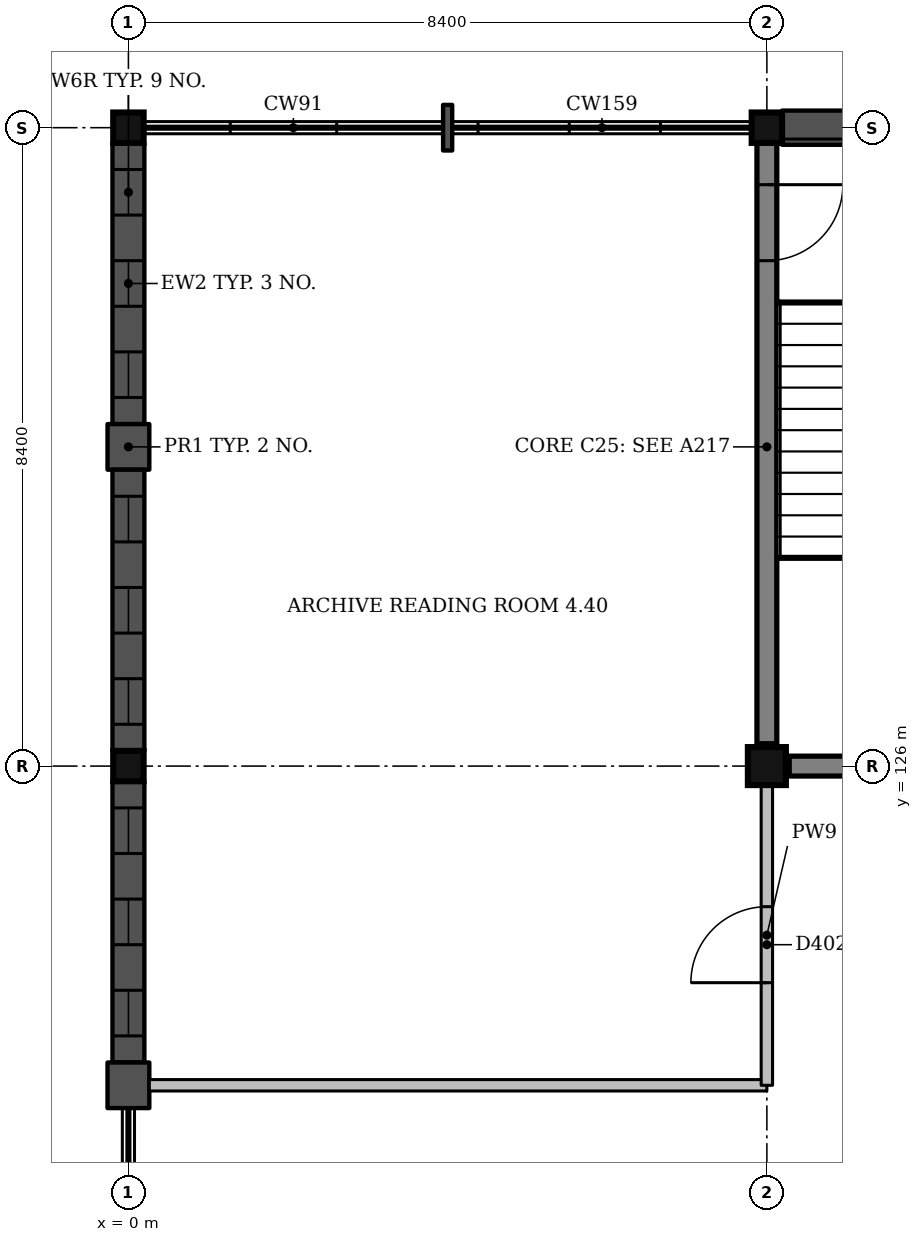
"""IFC4 building model, lengths in metres.
Left out: names, types, materials, properties, quantities, classifications, styles, units other than length and angle.
Written with IfcOpenShell. Run it as: python <this file> out.ifc"""

import sys

from ifc_helpers import new_model, si_unit, direction, frame, frame_2d, origin, origin_2d, place, context, subcontext, project, spatial, rectangle, extrude, element, fill, save


model = new_model("IFC4")
c1 = context("Model", 3, precision=1e-05, world=origin(), true_north=direction((0.0, 1.0)))
c2 = subcontext(c1, "Body", "Model", "MODEL_VIEW")
j1 = project(units=[si_unit("LENGTHUNIT", "METRE"), si_unit("PLANEANGLEUNIT", "RADIAN")], contexts=[c1])
p1 = place(None, origin())
s1 = spatial("IfcSite", under=j1, at=p1, CompositionType="ELEMENT")
p2 = place(p1, origin())
s2 = spatial("IfcBuilding", under=s1, at=p2, CompositionType="ELEMENT")
p3 = place(p2, frame((0.0, 0.0, 18.0)))
s3 = spatial("IfcBuildingStorey", under=s2, at=p3, CompositionType="ELEMENT", Elevation=18.0)
for number, where, z_axis, x_axis in (
    (1, (0.0, 126.0, 0.0), (0.0, 0.0, 1.0), (1.0, 0.0, 0.0)),
    (2, (0.0, 134.4, 0.0), (0.0, 0.0, 1.0), (1.0, 0.0, 0.0)),
):
    element("IfcColumn", number, at=place(p3, frame(where, z_axis=z_axis, x_axis=x_axis)), inside=s3, PredefinedType="COLUMN", context=c2, shape_type="SweptSolid", body=[
        extrude(rectangle(XDim=0.4, YDim=0.4, at=origin_2d()), origin(), (0.0, 0.0, 1.0), 4.5),
    ])
p4 = place(p3, frame((8.4, 126.0, 0.0), z_axis=(0.0, 0.0, 1.0), x_axis=(1.0, 0.0, 0.0)))
e3 = element("IfcColumn", 3, at=p4, inside=s3, PredefinedType="COLUMN", context=c2, shape_type="SweptSolid", body=[
    extrude(rectangle(XDim=0.5, YDim=0.5, at=origin_2d()), origin(), (0.0, 0.0, 1.0), 4.5),
])
p5 = place(p3, frame((8.4, 134.4, 0.0), z_axis=(0.0, 0.0, 1.0), x_axis=(1.0, 0.0, 0.0)))
e4 = element("IfcColumn", 4, at=p5, inside=s3, PredefinedType="COLUMN", context=c2, shape_type="SweptSolid", body=[
    extrude(rectangle(XDim=0.4, YDim=0.4, at=origin_2d()), origin(), (0.0, 0.0, 1.0), 4.5),
])
p6 = place(p3, frame((8.7, 126.0, 0.0), z_axis=(0.0, 0.0, 1.0), x_axis=(1.0, 0.0, 0.0)))
e5 = element("IfcWall", 5, at=p6, inside=s3, PredefinedType="SHEAR", context=c2, shape_type="SweptSolid", body=[
    extrude(rectangle(XDim=5.2, YDim=0.25, at=frame_2d((2.6, 0.0))), origin(), (0.0, 0.0, 1.0), 4.5),
])
p7 = place(p3, frame((8.4, 126.3, 0.0), z_axis=(0.0, 0.0, 1.0), x_axis=(0.0, 1.0, 0.0)))
e6 = element("IfcWall", 6, at=p7, inside=s3, PredefinedType="SHEAR", context=c2, shape_type="SweptSolid", body=[
    extrude(rectangle(XDim=7.9, YDim=0.25, at=frame_2d((3.95, 0.0))), origin(), (0.0, 0.0, 1.0), 4.5),
])
p8 = place(p7, frame((6.35, 0.0, 0.0)))
e7 = element("IfcOpeningElement", 7, at=p8, cuts=e6, PredefinedType="OPENING", context=c2, shape_type="SweptSolid", body=[
    extrude(rectangle(XDim=1.0, YDim=2.1, at=frame_2d((0.5, 1.05))), frame((0.0, 0.135, 0.0), z_axis=(0.0, -1.0, 0.0), x_axis=(1.0, 0.0, 0.0)), (0.0, 0.0, 1.0), 0.27),
])
p9 = place(p3, frame((11.207, 134.4, 0.0), z_axis=(0.0, 0.0, 1.0), x_axis=(-1.0, 0.0, 0.0)))
e8 = element("IfcWall", 8, at=p9, inside=s3, PredefinedType="SOLIDWALL", context=c2, shape_type="SweptSolid", body=[
    extrude(rectangle(XDim=2.607, YDim=0.45, at=frame_2d((1.303, 0.0))), origin(), (0.0, 0.0, 1.0), 3.35),
])
p10 = place(p3, frame((4.26, 134.4, 0.0), z_axis=(0.0, 0.0, 1.0), x_axis=(-1.0, 0.0, 0.0)))
e9 = element("IfcWall", 9, at=p10, inside=s3, PredefinedType="SOLIDWALL", context=c2, shape_type="SweptSolid", body=[
    extrude(rectangle(XDim=0.12, YDim=0.6, at=frame_2d((0.06, 0.0))), origin(), (0.0, 0.0, 1.0), 3.35),
])
p11 = place(p3, frame((0.0, 134.2, 0.0), z_axis=(0.0, 0.0, 1.0), x_axis=(0.0, -1.0, 0.0)))
e10 = element("IfcWall", 10, at=p11, inside=s3, PredefinedType="SOLIDWALL", context=c2, shape_type="SweptSolid", body=[
    extrude(rectangle(XDim=3.7, YDim=0.42, at=frame_2d((1.85, 0.0))), origin(), (0.0, 0.0, 1.0), 3.35),
])
p12 = place(p11, frame((0.35, 0.0, 1.0)))
e11 = element("IfcOpeningElement", 11, at=p12, cuts=e10, PredefinedType="OPENING", context=c2, shape_type="SweptSolid", body=[
    extrude(rectangle(XDim=0.6, YDim=1.8, at=frame_2d((0.3, 0.9))), frame((0.0, 0.22, 0.0), z_axis=(0.0, -1.0, 0.0), x_axis=(1.0, 0.0, 0.0)), (0.0, 0.0, 1.0), 0.44),
])
p13 = place(p11, frame((1.55, 0.0, 1.0)))
e12 = element("IfcOpeningElement", 12, at=p13, cuts=e10, PredefinedType="OPENING", context=c2, shape_type="SweptSolid", body=[
    extrude(rectangle(XDim=0.6, YDim=1.8, at=frame_2d((0.3, 0.9))), frame((0.0, 0.22, 0.0), z_axis=(0.0, -1.0, 0.0), x_axis=(1.0, 0.0, 0.0)), (0.0, 0.0, 1.0), 0.44),
])
p14 = place(p11, frame((2.75, 0.0, 1.0)))
e13 = element("IfcOpeningElement", 13, at=p14, cuts=e10, PredefinedType="OPENING", context=c2, shape_type="SweptSolid", body=[
    extrude(rectangle(XDim=0.6, YDim=1.8, at=frame_2d((0.3, 0.9))), frame((0.0, 0.22, 0.0), z_axis=(0.0, -1.0, 0.0), x_axis=(1.0, 0.0, 0.0)), (0.0, 0.0, 1.0), 0.44),
])
p15 = place(p3, frame((0.0, 130.5, 0.0), z_axis=(0.0, 0.0, 1.0), x_axis=(0.0, -1.0, 0.0)))
e14 = element("IfcWall", 14, at=p15, inside=s3, PredefinedType="SOLIDWALL", context=c2, shape_type="SweptSolid", body=[
    extrude(rectangle(XDim=0.6, YDim=0.55, at=frame_2d((0.3, 0.0))), origin(), (0.0, 0.0, 1.0), 3.35),
])
p16 = place(p3, frame((0.0, 129.9, 0.0), z_axis=(0.0, 0.0, 1.0), x_axis=(0.0, -1.0, 0.0)))
e15 = element("IfcWall", 15, at=p16, inside=s3, PredefinedType="SOLIDWALL", context=c2, shape_type="SweptSolid", body=[
    extrude(rectangle(XDim=3.7, YDim=0.42, at=frame_2d((1.85, 0.0))), origin(), (0.0, 0.0, 1.0), 3.35),
])
p17 = place(p16, frame((0.35, 0.0, 1.0)))
e16 = element("IfcOpeningElement", 16, at=p17, cuts=e15, PredefinedType="OPENING", context=c2, shape_type="SweptSolid", body=[
    extrude(rectangle(XDim=0.6, YDim=1.8, at=frame_2d((0.3, 0.9))), frame((0.0, 0.22, 0.0), z_axis=(0.0, -1.0, 0.0), x_axis=(1.0, 0.0, 0.0)), (0.0, 0.0, 1.0), 0.44),
])
p18 = place(p16, frame((1.55, 0.0, 1.0)))
e17 = element("IfcOpeningElement", 17, at=p18, cuts=e15, PredefinedType="OPENING", context=c2, shape_type="SweptSolid", body=[
    extrude(rectangle(XDim=0.6, YDim=1.8, at=frame_2d((0.3, 0.9))), frame((0.0, 0.22, 0.0), z_axis=(0.0, -1.0, 0.0), x_axis=(1.0, 0.0, 0.0)), (0.0, 0.0, 1.0), 0.44),
])
p19 = place(p16, frame((2.75, 0.0, 1.0)))
e18 = element("IfcOpeningElement", 18, at=p19, cuts=e15, PredefinedType="OPENING", context=c2, shape_type="SweptSolid", body=[
    extrude(rectangle(XDim=0.6, YDim=1.8, at=frame_2d((0.3, 0.9))), frame((0.0, 0.22, 0.0), z_axis=(0.0, -1.0, 0.0), x_axis=(1.0, 0.0, 0.0)), (0.0, 0.0, 1.0), 0.44),
])
p20 = place(p3, frame((0.0, 125.8, 0.0), z_axis=(0.0, 0.0, 1.0), x_axis=(0.0, -1.0, 0.0)))
e19 = element("IfcWall", 19, at=p20, inside=s3, PredefinedType="SOLIDWALL", context=c2, shape_type="SweptSolid", body=[
    extrude(rectangle(XDim=3.7, YDim=0.42, at=frame_2d((1.85, 0.0))), origin(), (0.0, 0.0, 1.0), 3.35),
])
p21 = place(p20, frame((0.35, 0.0, 1.0)))
e20 = element("IfcOpeningElement", 20, at=p21, cuts=e19, PredefinedType="OPENING", context=c2, shape_type="SweptSolid", body=[
    extrude(rectangle(XDim=0.6, YDim=1.8, at=frame_2d((0.3, 0.9))), frame((0.0, 0.22, 0.0), z_axis=(0.0, -1.0, 0.0), x_axis=(1.0, 0.0, 0.0)), (0.0, 0.0, 1.0), 0.44),
])
p22 = place(p20, frame((1.55, 0.0, 1.0)))
e21 = element("IfcOpeningElement", 21, at=p22, cuts=e19, PredefinedType="OPENING", context=c2, shape_type="SweptSolid", body=[
    extrude(rectangle(XDim=0.6, YDim=1.8, at=frame_2d((0.3, 0.9))), frame((0.0, 0.22, 0.0), z_axis=(0.0, -1.0, 0.0), x_axis=(1.0, 0.0, 0.0)), (0.0, 0.0, 1.0), 0.44),
])
p23 = place(p20, frame((2.75, 0.0, 1.0)))
e22 = element("IfcOpeningElement", 22, at=p23, cuts=e19, PredefinedType="OPENING", context=c2, shape_type="SweptSolid", body=[
    extrude(rectangle(XDim=0.6, YDim=1.8, at=frame_2d((0.3, 0.9))), frame((0.0, 0.22, 0.0), z_axis=(0.0, -1.0, 0.0), x_axis=(1.0, 0.0, 0.0)), (0.0, 0.0, 1.0), 0.44),
])
p24 = place(p3, frame((0.0, 122.1, 0.0), z_axis=(0.0, 0.0, 1.0), x_axis=(0.0, -1.0, 0.0)))
e23 = element("IfcWall", 23, at=p24, inside=s3, PredefinedType="SOLIDWALL", context=c2, shape_type="SweptSolid", body=[
    extrude(rectangle(XDim=0.6, YDim=0.55, at=frame_2d((0.3, 0.0))), origin(), (0.0, 0.0, 1.0), 3.35),
])
p25 = place(p3, frame((0.275, 121.8, 0.0), z_axis=(0.0, 0.0, 1.0), x_axis=(1.0, 0.0, 0.0)))
e24 = element("IfcWall", 24, at=p25, inside=s3, PredefinedType="PARTITIONING", context=c2, shape_type="SweptSolid", body=[
    extrude(rectangle(XDim=8.125, YDim=0.15, at=frame_2d((4.062, 0.0))), origin(), (0.0, 0.0, 1.0), 3.4),
])
p26 = place(p3, frame((8.4, 121.8, 0.0), z_axis=(0.0, 0.0, 1.0), x_axis=(0.0, 1.0, 0.0)))
e25 = element("IfcWall", 25, at=p26, inside=s3, PredefinedType="PARTITIONING", context=c2, shape_type="SweptSolid", body=[
    extrude(rectangle(XDim=3.95, YDim=0.15, at=frame_2d((1.975, 0.0))), origin(), (0.0, 0.0, 1.0), 3.4),
])
p27 = place(p26, frame((1.35, 0.0, 0.0)))
e26 = element("IfcOpeningElement", 26, at=p27, cuts=e25, PredefinedType="OPENING", context=c2, shape_type="SweptSolid", body=[
    extrude(rectangle(XDim=1.0, YDim=2.1, at=frame_2d((0.5, 1.05))), frame((0.0, 0.085, 0.0), z_axis=(0.0, -1.0, 0.0), x_axis=(1.0, 0.0, 0.0)), (0.0, 0.0, 1.0), 0.17),
])
p28 = place(p12, origin())
e27 = element("IfcWindow", 27, at=p28, inside=s3, PartitioningType="SINGLE_PANEL", PredefinedType="WINDOW", context=c2, shape_type="SweptSolid", body=[
    extrude(rectangle(XDim=0.6, YDim=1.8, at=frame_2d((0.3, 0.9))), frame((0.0, 0.15, 0.0), z_axis=(0.0, -1.0, 0.0), x_axis=(1.0, 0.0, 0.0)), (0.0, 0.0, 1.0), 0.06),
])
fill(e11, e27)
p29 = place(p13, origin())
e28 = element("IfcWindow", 28, at=p29, inside=s3, PartitioningType="SINGLE_PANEL", PredefinedType="WINDOW", context=c2, shape_type="SweptSolid", body=[
    extrude(rectangle(XDim=0.6, YDim=1.8, at=frame_2d((0.3, 0.9))), frame((0.0, 0.15, 0.0), z_axis=(0.0, -1.0, 0.0), x_axis=(1.0, 0.0, 0.0)), (0.0, 0.0, 1.0), 0.06),
])
fill(e12, e28)
p30 = place(p14, origin())
e29 = element("IfcWindow", 29, at=p30, inside=s3, PartitioningType="SINGLE_PANEL", PredefinedType="WINDOW", context=c2, shape_type="SweptSolid", body=[
    extrude(rectangle(XDim=0.6, YDim=1.8, at=frame_2d((0.3, 0.9))), frame((0.0, 0.15, 0.0), z_axis=(0.0, -1.0, 0.0), x_axis=(1.0, 0.0, 0.0)), (0.0, 0.0, 1.0), 0.06),
])
fill(e13, e29)
p31 = place(p17, origin())
e30 = element("IfcWindow", 30, at=p31, inside=s3, PartitioningType="SINGLE_PANEL", PredefinedType="WINDOW", context=c2, shape_type="SweptSolid", body=[
    extrude(rectangle(XDim=0.6, YDim=1.8, at=frame_2d((0.3, 0.9))), frame((0.0, 0.15, 0.0), z_axis=(0.0, -1.0, 0.0), x_axis=(1.0, 0.0, 0.0)), (0.0, 0.0, 1.0), 0.06),
])
fill(e16, e30)
p32 = place(p18, origin())
e31 = element("IfcWindow", 31, at=p32, inside=s3, PartitioningType="SINGLE_PANEL", PredefinedType="WINDOW", context=c2, shape_type="SweptSolid", body=[
    extrude(rectangle(XDim=0.6, YDim=1.8, at=frame_2d((0.3, 0.9))), frame((0.0, 0.15, 0.0), z_axis=(0.0, -1.0, 0.0), x_axis=(1.0, 0.0, 0.0)), (0.0, 0.0, 1.0), 0.06),
])
fill(e17, e31)
p33 = place(p19, origin())
e32 = element("IfcWindow", 32, at=p33, inside=s3, PartitioningType="SINGLE_PANEL", PredefinedType="WINDOW", context=c2, shape_type="SweptSolid", body=[
    extrude(rectangle(XDim=0.6, YDim=1.8, at=frame_2d((0.3, 0.9))), frame((0.0, 0.15, 0.0), z_axis=(0.0, -1.0, 0.0), x_axis=(1.0, 0.0, 0.0)), (0.0, 0.0, 1.0), 0.06),
])
fill(e18, e32)
p34 = place(p21, origin())
e33 = element("IfcWindow", 33, at=p34, inside=s3, PartitioningType="SINGLE_PANEL", PredefinedType="WINDOW", context=c2, shape_type="SweptSolid", body=[
    extrude(rectangle(XDim=0.6, YDim=1.8, at=frame_2d((0.3, 0.9))), frame((0.0, 0.15, 0.0), z_axis=(0.0, -1.0, 0.0), x_axis=(1.0, 0.0, 0.0)), (0.0, 0.0, 1.0), 0.06),
])
fill(e20, e33)
p35 = place(p22, origin())
e34 = element("IfcWindow", 34, at=p35, inside=s3, PartitioningType="SINGLE_PANEL", PredefinedType="WINDOW", context=c2, shape_type="SweptSolid", body=[
    extrude(rectangle(XDim=0.6, YDim=1.8, at=frame_2d((0.3, 0.9))), frame((0.0, 0.15, 0.0), z_axis=(0.0, -1.0, 0.0), x_axis=(1.0, 0.0, 0.0)), (0.0, 0.0, 1.0), 0.06),
])
fill(e21, e34)
p36 = place(p23, origin())
e35 = element("IfcWindow", 35, at=p36, inside=s3, PartitioningType="SINGLE_PANEL", PredefinedType="WINDOW", context=c2, shape_type="SweptSolid", body=[
    extrude(rectangle(XDim=0.6, YDim=1.8, at=frame_2d((0.3, 0.9))), frame((0.0, 0.15, 0.0), z_axis=(0.0, -1.0, 0.0), x_axis=(1.0, 0.0, 0.0)), (0.0, 0.0, 1.0), 0.06),
])
fill(e22, e35)
p37 = place(p27, origin())
e36 = element("IfcDoor", 36, at=p37, inside=s3, OperationType="SINGLE_SWING_LEFT", PredefinedType="DOOR", context=c2, shape_type="SweptSolid", body=[
    extrude(rectangle(XDim=1.0, YDim=2.1, at=frame_2d((0.5, 1.05))), frame((0.0, 0.025, 0.0), z_axis=(0.0, -1.0, 0.0), x_axis=(1.0, 0.0, 0.0)), (0.0, 0.0, 1.0), 0.05),
])
fill(e26, e36)
p38 = place(p8, origin())
e37 = element("IfcDoor", 37, at=p38, inside=s3, OperationType="SINGLE_SWING_RIGHT", PredefinedType="DOOR", context=c2, shape_type="SweptSolid", body=[
    extrude(rectangle(XDim=1.0, YDim=2.1, at=frame_2d((0.5, 1.05))), frame((0.0, 0.025, 0.0), z_axis=(0.0, -1.0, 0.0), x_axis=(1.0, 0.0, 0.0)), (0.0, 0.0, 1.0), 0.05),
])
fill(e7, e37)
save(model, sys.argv[1])
